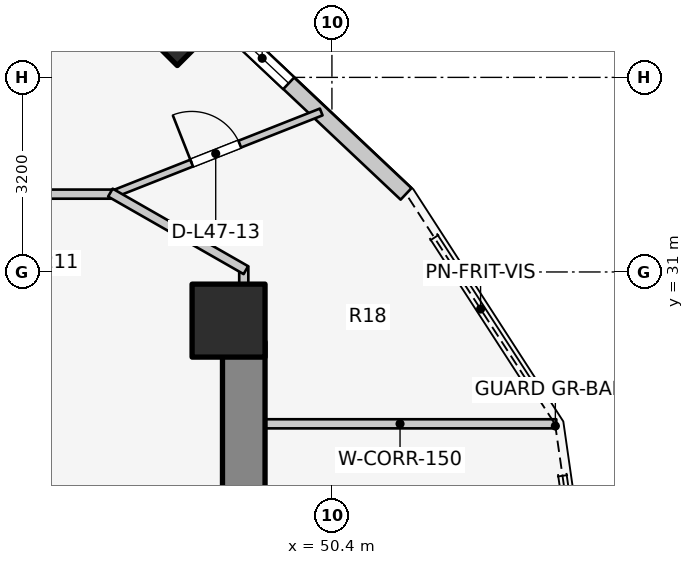
"""IFC4 building model, lengths in metres.
Left out: names, types, materials, properties, quantities, classifications, styles, units other than length and angle.
Written with IfcOpenShell. Run it as: python <this file> out.ifc"""

import sys

from ifc_helpers import new_model, si_unit, direction, frame, frame_2d, origin, origin_2d, place, context, subcontext, project, spatial, rectangle, extrude, element, fill, save


model = new_model("IFC4")
c1 = context("Model", 3, precision=1e-05, world=origin(), true_north=direction((0.0, 1.0)))
c2 = subcontext(c1, "Body", "Model", "MODEL_VIEW")
j1 = project(units=[si_unit("LENGTHUNIT", "METRE"), si_unit("PLANEANGLEUNIT", "RADIAN")], contexts=[c1])
p1 = place(None, origin())
s1 = spatial("IfcSite", under=j1, at=p1, CompositionType="ELEMENT")
p2 = place(p1, origin())
s2 = spatial("IfcBuilding", under=s1, at=p2, CompositionType="ELEMENT")
p3 = place(p2, frame((0.0, 0.0, 156.0)))
s3 = spatial("IfcBuildingStorey", under=s2, at=p3, CompositionType="ELEMENT", Elevation=156.0)
p4 = place(p3, frame((48.95, 17.05, 0.0), z_axis=(0.0, 0.0, 1.0), x_axis=(0.0, 1.0, 0.0)))
e1 = element("IfcWall", 1, at=p4, inside=s3, PredefinedType="SHEAR", context=c2, shape_type="SweptSolid", body=[
    extrude(rectangle(XDim=12.8, YDim=0.7, at=frame_2d((6.4, 0.0))), origin(), (0.0, 0.0, 1.0), 3.1),
])
p5 = place(p3, frame((48.7, 30.2, 0.0), z_axis=(0.0, 0.0, 1.0), x_axis=(1.0, 0.0, 0.0)))
e2 = element("IfcColumn", 2, at=p5, inside=s3, PredefinedType="COLUMN", context=c2, shape_type="SweptSolid", body=[
    extrude(rectangle(XDim=1.2, YDim=1.2, at=origin_2d()), origin(), (0.0, 0.0, 1.0), 3.1),
])
p6 = place(p3, frame((47.857, 35.031, 0.0), z_axis=(0.0, 0.0, 1.0), x_axis=(0.707106781187, 0.707106781187, 0.0)))
e3 = element("IfcColumn", 3, at=p6, inside=s3, PredefinedType="COLUMN", context=c2, shape_type="SweptSolid", body=[
    extrude(rectangle(XDim=0.9, YDim=0.9, at=origin_2d()), origin(), (0.0, 0.0, 1.0), 3.1),
])
p7 = place(p3, frame((51.619, 32.284, 0.0), z_axis=(0.0, 0.0, 1.0), x_axis=(-0.727667301037, 0.68593024354, 0.0)))
e4 = element("IfcWall", 4, at=p7, inside=s3, PredefinedType="STANDARD", context=c2, shape_type="SweptSolid", body=[
    extrude(rectangle(XDim=4.604, YDim=0.26, at=frame_2d((2.302, 0.0))), origin(), (0.0, 0.0, 1.0), 2.85),
])
p8 = place(p7, frame((2.652, 0.0, 0.75)))
e5 = element("IfcOpeningElement", 5, at=p8, cuts=e4, PredefinedType="OPENING", context=c2, shape_type="SweptSolid", body=[
    extrude(rectangle(XDim=1.2, YDim=1.5, at=frame_2d((0.6, 0.75))), frame((0.0, 0.14, 0.0), z_axis=(0.0, -1.0, 0.0), x_axis=(1.0, 0.0, 0.0)), (0.0, 0.0, 1.0), 0.28),
])
p9 = place(p3, frame((48.95, 28.503, 0.0), z_axis=(0.0, 0.0, 1.0), x_axis=(1.0, 0.0, 0.0)))
e6 = element("IfcWall", 6, at=p9, inside=s3, PredefinedType="PARTITIONING", context=c2, shape_type="SweptSolid", body=[
    extrude(rectangle(XDim=5.14, YDim=0.15, at=frame_2d((2.57, 0.0))), origin(), (0.0, 0.0, 1.0), 2.855),
])
p10 = place(p3, frame((48.95, 29.8, 0.0), z_axis=(0.0, 0.0, 1.0), x_axis=(0.0, 1.0, 0.0)))
e7 = element("IfcWall", 7, at=p10, inside=s3, PredefinedType="PARTITIONING", context=c2, shape_type="SweptSolid", body=[
    extrude(rectangle(XDim=1.29, YDim=0.15, at=frame_2d((0.645, 0.0))), origin(), (0.0, 0.0, 1.0), 2.855),
])
p11 = place(p3, frame((46.753, 32.262, 0.0), z_axis=(0.0, 0.0, 1.0), x_axis=(0.930204027108, 0.367042869367, 0.0)))
e8 = element("IfcWall", 8, at=p11, inside=s3, PredefinedType="MOVABLE", context=c2, shape_type="SweptSolid", body=[
    extrude(rectangle(XDim=3.731, YDim=0.12, at=frame_2d((1.865, 0.0))), origin(), (0.0, 0.0, 1.0), 2.22),
])
p12 = place(p11, frame((1.44, 0.0, 0.0)))
e9 = element("IfcOpeningElement", 9, at=p12, cuts=e8, PredefinedType="OPENING", context=c2, shape_type="SweptSolid", body=[
    extrude(rectangle(XDim=0.85, YDim=2.05, at=frame_2d((0.425, 1.025))), frame((0.0, 0.07, 0.0), z_axis=(0.0, -1.0, 0.0), x_axis=(1.0, 0.0, 0.0)), (0.0, 0.0, 1.0), 0.14),
])
p13 = place(p3, frame((39.33, 32.28, 0.0), z_axis=(0.0, 0.0, 1.0), x_axis=(1.0, 0.0, 0.0)))
e10 = element("IfcWall", 10, at=p13, inside=s3, PredefinedType="PARTITIONING", context=c2, shape_type="SweptSolid", body=[
    extrude(rectangle(XDim=7.52, YDim=0.15, at=frame_2d((3.76, 0.0))), origin(), (0.0, 0.0, 1.0), 2.299),
])
p14 = place(p13, frame((5.22, 0.0, 0.0)))
e11 = element("IfcOpeningElement", 11, at=p14, cuts=e10, PredefinedType="OPENING", context=c2, shape_type="SweptSolid", body=[
    extrude(rectangle(XDim=0.9, YDim=2.1, at=frame_2d((0.45, 1.05))), frame((0.0, 0.085, 0.0), z_axis=(0.0, -1.0, 0.0), x_axis=(1.0, 0.0, 0.0)), (0.0, 0.0, 1.0), 0.17),
])
p15 = place(p3, frame((46.757, 32.305, 0.0), z_axis=(0.0, 0.0, 1.0), x_axis=(0.867991349648, -0.496579315857, 0.0)))
e12 = element("IfcWall", 12, at=p15, inside=s3, PredefinedType="PARTITIONING", context=c2, shape_type="SweptSolid", body=[
    extrude(rectangle(XDim=2.567, YDim=0.15, at=frame_2d((1.283, 0.0))), origin(), (0.0, 0.0, 1.0), 2.22),
])
p16 = place(p8, origin())
e13 = element("IfcWindow", 13, at=p16, inside=s3, PartitioningType="SINGLE_PANEL", PredefinedType="WINDOW", context=c2, shape_type="SweptSolid", body=[
    extrude(rectangle(XDim=1.2, YDim=1.5, at=frame_2d((0.6, 0.75))), frame((0.0, 0.03, 0.0), z_axis=(0.0, -1.0, 0.0), x_axis=(1.0, 0.0, 0.0)), (0.0, 0.0, 1.0), 0.06),
])
fill(e5, e13)
p17 = place(p12, origin())
e14 = element("IfcDoor", 14, at=p17, inside=s3, OperationType="SINGLE_SWING_LEFT", PredefinedType="DOOR", context=c2, shape_type="SweptSolid", body=[
    extrude(rectangle(XDim=0.85, YDim=2.05, at=frame_2d((0.425, 1.025))), frame((0.0, 0.025, 0.0), z_axis=(0.0, -1.0, 0.0), x_axis=(1.0, 0.0, 0.0)), (0.0, 0.0, 1.0), 0.05),
])
fill(e9, e14)
save(model, sys.argv[1])
